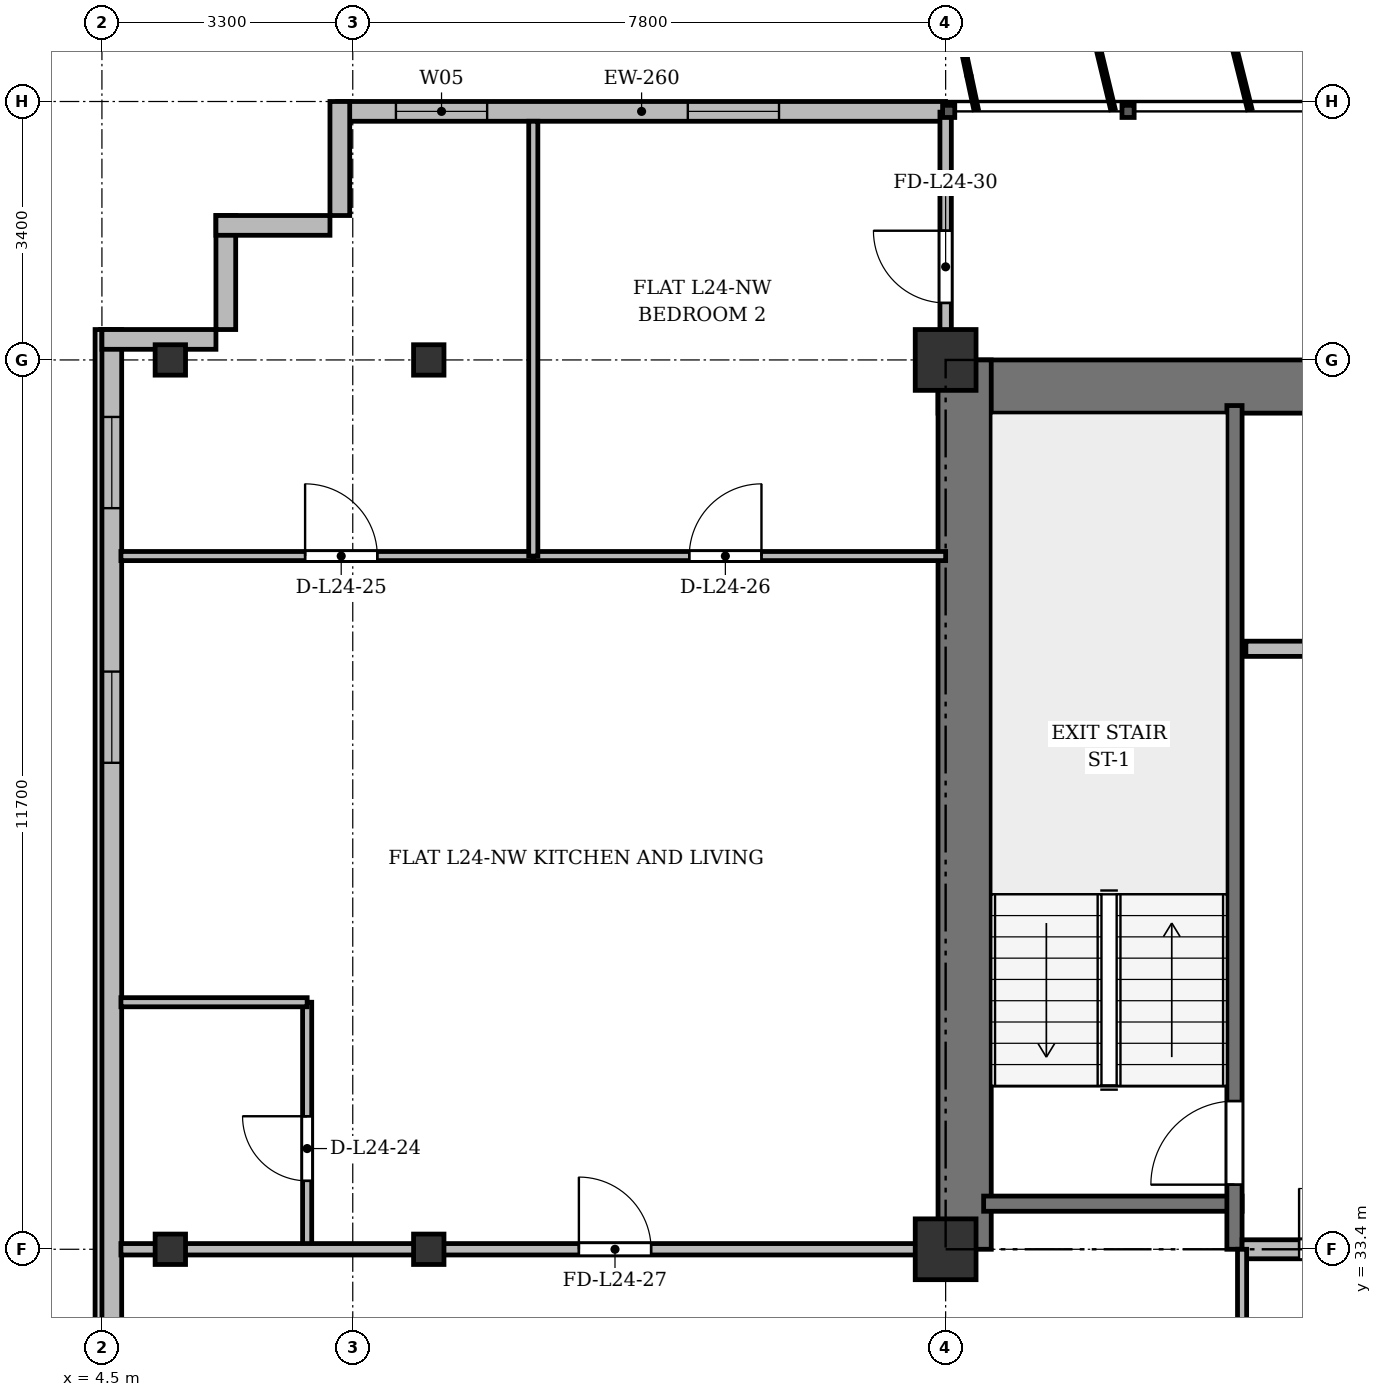
"""IFC4 building model, lengths in metres.
Left out: names, types, materials, properties, quantities, classifications, styles, units other than length and angle.
Written with IfcOpenShell. Run it as: python <this file> out.ifc"""

import sys

from ifc_helpers import new_model, si_unit, direction, frame, frame_2d, origin, origin_2d, place, context, subcontext, project, spatial, rectangle, i_section, extrude, source, transform, mapped, element, fill, save


model = new_model("IFC4")
c1 = context("Model", 3, precision=1e-05, world=origin(), true_north=direction((0.0, 1.0)))
c2 = subcontext(c1, "Body", "Model", "MODEL_VIEW")
j1 = project(units=[si_unit("LENGTHUNIT", "METRE"), si_unit("PLANEANGLEUNIT", "RADIAN")], contexts=[c1])
p1 = place(None, origin())
s1 = spatial("IfcSite", under=j1, at=p1, CompositionType="ELEMENT")
p2 = place(p1, origin())
s2 = spatial("IfcBuilding", under=s1, at=p2, CompositionType="ELEMENT")
p3 = place(p2, frame((0.0, 0.0, 96.1)))
s3 = spatial("IfcBuildingStorey", under=s2, at=p3, CompositionType="ELEMENT", Elevation=96.1)
m1 = source(origin(), c2, "Body", "SweptSolid", [
    extrude(i_section(OverallWidth=0.4, OverallDepth=0.4, WebThickness=0.022, FlangeThickness=0.035, at=origin_2d()), origin(), (0.0, 0.0, 1.0), 3.6),
])
for number, where, z_axis, x_axis in (
    (1, (5.4, 33.4, 0.0), (0.0, 0.0, 1.0), (1.0, 0.0, 0.0)),
    (2, (5.4, 45.1, 0.0), (0.0, 0.0, 1.0), (1.0, 0.0, 0.0)),
    (3, (8.8, 33.4, 0.0), (0.0, 0.0, 1.0), (1.0, 0.0, 0.0)),
    (4, (8.8, 45.1, 0.0), (0.0, 0.0, 1.0), (1.0, 0.0, 0.0)),
):
    element("IfcColumn", number, at=place(p3, frame(where, z_axis=z_axis, x_axis=x_axis)), inside=s3, PredefinedType="COLUMN", context=c2, shape_type="MappedRepresentation", body=[
        mapped(m1, transform((0.0, 0.0, 0.0), x_axis=(1.0, 0.0, 0.0), y_axis=(0.0, 1.0, 0.0), z_axis=(0.0, 0.0, 1.0), scale=1.0)),
    ])
m2 = source(origin(), c2, "Body", "SweptSolid", [
    extrude(rectangle(XDim=0.8, YDim=0.8, at=origin_2d()), origin(), (0.0, 0.0, 1.0), 3.6),
])
for number, where, z_axis, x_axis in (
    (5, (15.6, 33.4, 0.0), (0.0, 0.0, 1.0), (1.0, 0.0, 0.0)),
    (6, (15.6, 45.1, 0.0), (0.0, 0.0, 1.0), (1.0, 0.0, 0.0)),
):
    element("IfcColumn", number, at=place(p3, frame(where, z_axis=z_axis, x_axis=x_axis)), inside=s3, PredefinedType="COLUMN", context=c2, shape_type="MappedRepresentation", body=[
        mapped(m2, transform((0.0, 0.0, 0.0), x_axis=(1.0, 0.0, 0.0), y_axis=(0.0, 1.0, 0.0), z_axis=(0.0, 0.0, 1.0), scale=1.0)),
    ])
p4 = place(p3, frame((7.6, 48.37, 0.0), z_axis=(0.0, 0.0, 1.0), x_axis=(1.0, 0.0, 0.0)))
e7 = element("IfcWall", 7, at=p4, inside=s3, PredefinedType="SOLIDWALL", context=c2, shape_type="SweptSolid", body=[
    extrude(rectangle(XDim=8.0, YDim=0.26, at=frame_2d((4.0, 0.0))), origin(), (0.0, 0.0, 1.0), 3.34),
])
p5 = place(p4, frame((0.768, 0.0, 0.9)))
e8 = element("IfcOpeningElement", 8, at=p5, cuts=e7, PredefinedType="OPENING", context=c2, shape_type="SweptSolid", body=[
    extrude(rectangle(XDim=1.2, YDim=1.65, at=frame_2d((0.6, 0.825))), frame((0.0, 0.14, 0.0), z_axis=(0.0, -1.0, 0.0), x_axis=(1.0, 0.0, 0.0)), (0.0, 0.0, 1.0), 0.28),
])
p6 = place(p4, frame((4.608, 0.0, 0.9)))
e9 = element("IfcOpeningElement", 9, at=p6, cuts=e7, PredefinedType="OPENING", context=c2, shape_type="SweptSolid", body=[
    extrude(rectangle(XDim=1.2, YDim=1.65, at=frame_2d((0.6, 0.825))), frame((0.0, 0.14, 0.0), z_axis=(0.0, -1.0, 0.0), x_axis=(1.0, 0.0, 0.0)), (0.0, 0.0, 1.0), 0.28),
])
p7 = place(p3, frame((4.63, 5.9, 0.0), z_axis=(0.0, 0.0, 1.0), x_axis=(0.0, 1.0, 0.0)))
e10 = element("IfcWall", 10, at=p7, inside=s3, PredefinedType="SOLIDWALL", context=c2, shape_type="SweptSolid", body=[
    extrude(rectangle(XDim=39.6, YDim=0.26, at=frame_2d((19.8, 0.0))), origin(), (0.0, 0.0, 1.0), 3.34),
])
p8 = place(p7, frame((1.45, 0.0, 0.92)))
e11 = element("IfcOpeningElement", 11, at=p8, cuts=e10, PredefinedType="OPENING", context=c2, shape_type="SweptSolid", body=[
    extrude(rectangle(XDim=1.2, YDim=1.65, at=frame_2d((0.6, 0.825))), frame((0.0, 0.14, 0.0), z_axis=(0.0, -1.0, 0.0), x_axis=(1.0, 0.0, 0.0)), (0.0, 0.0, 1.0), 0.28),
])
p9 = place(p7, frame((4.2, 0.0, 0.92)))
e12 = element("IfcOpeningElement", 12, at=p9, cuts=e10, PredefinedType="OPENING", context=c2, shape_type="SweptSolid", body=[
    extrude(rectangle(XDim=2.6, YDim=1.9, at=frame_2d((1.3, 0.95))), frame((0.0, 0.14, 0.0), z_axis=(0.0, -1.0, 0.0), x_axis=(1.0, 0.0, 0.0)), (0.0, 0.0, 1.0), 0.28),
])
p10 = place(p7, frame((8.4, 0.0, 0.92)))
e13 = element("IfcOpeningElement", 13, at=p10, cuts=e10, PredefinedType="OPENING", context=c2, shape_type="SweptSolid", body=[
    extrude(rectangle(XDim=2.6, YDim=1.9, at=frame_2d((1.3, 0.95))), frame((0.0, 0.14, 0.0), z_axis=(0.0, -1.0, 0.0), x_axis=(1.0, 0.0, 0.0)), (0.0, 0.0, 1.0), 0.28),
])
p11 = place(p7, frame((33.9, 0.0, 0.92)))
e14 = element("IfcOpeningElement", 14, at=p11, cuts=e10, PredefinedType="OPENING", context=c2, shape_type="SweptSolid", body=[
    extrude(rectangle(XDim=1.2, YDim=1.65, at=frame_2d((0.6, 0.825))), frame((0.0, 0.14, 0.0), z_axis=(0.0, -1.0, 0.0), x_axis=(1.0, 0.0, 0.0)), (0.0, 0.0, 1.0), 0.28),
])
p12 = place(p7, frame((37.25, 0.0, 0.92)))
e15 = element("IfcOpeningElement", 15, at=p12, cuts=e10, PredefinedType="OPENING", context=c2, shape_type="SweptSolid", body=[
    extrude(rectangle(XDim=1.2, YDim=1.65, at=frame_2d((0.6, 0.825))), frame((0.0, 0.14, 0.0), z_axis=(0.0, -1.0, 0.0), x_axis=(1.0, 0.0, 0.0)), (0.0, 0.0, 1.0), 0.28),
])
p13 = place(p3, frame((4.5, 45.37, 0.0), z_axis=(0.0, 0.0, 1.0), x_axis=(1.0, 0.0, 0.0)))
e16 = element("IfcWall", 16, at=p13, inside=s3, PredefinedType="SOLIDWALL", context=c2, shape_type="SweptSolid", body=[
    extrude(rectangle(XDim=1.5, YDim=0.26, at=frame_2d((0.75, 0.0))), origin(), (0.0, 0.0, 1.0), 2.752),
])
for number, where, z_axis, x_axis in (
    (17, (6.13, 45.5, 0.0), (0.0, 0.0, 1.0), (0.0, 1.0, 0.0)),
    (18, (6.0, 46.87, 0.0), (0.0, 0.0, 1.0), (1.0, 0.0, 0.0)),
    (19, (7.63, 47.0, 0.0), (0.0, 0.0, 1.0), (0.0, 1.0, 0.0)),
):
    element("IfcWall", number, at=place(p3, frame(where, z_axis=z_axis, x_axis=x_axis)), inside=s3, PredefinedType="SOLIDWALL", context=c2, shape_type="SweptSolid", body=[
        extrude(rectangle(XDim=1.5, YDim=0.26, at=frame_2d((0.75, 0.0))), origin(), (0.0, 0.0, 1.0), 3.34),
    ])
p14 = place(p3, frame((15.5, 44.75, 0.0), z_axis=(0.0, 0.0, 1.0), x_axis=(1.0, 0.0, 0.0)))
e20 = element("IfcWall", 20, at=p14, inside=s3, PredefinedType="SHEAR", context=c2, shape_type="SweptSolid", body=[
    extrude(rectangle(XDim=43.4, YDim=0.7, at=frame_2d((21.7, 0.0))), origin(), (0.0, 0.0, 1.0), 3.34),
])
p15 = place(p3, frame((15.85, 33.4, 0.0), z_axis=(0.0, 0.0, 1.0), x_axis=(0.0, 1.0, 0.0)))
e21 = element("IfcWall", 21, at=p15, inside=s3, PredefinedType="SHEAR", context=c2, shape_type="SweptSolid", body=[
    extrude(rectangle(XDim=11.7, YDim=0.7, at=frame_2d((5.85, 0.0))), origin(), (0.0, 0.0, 1.0), 3.34),
])
p16 = place(p3, frame((16.1, 34.0, 0.0), z_axis=(0.0, 0.0, 1.0), x_axis=(1.0, 0.0, 0.0)))
e22 = element("IfcWall", 22, at=p16, inside=s3, PredefinedType="SHEAR", context=c2, shape_type="SweptSolid", body=[
    extrude(rectangle(XDim=3.4, YDim=0.2, at=frame_2d((1.7, 0.0))), origin(), (0.0, 0.0, 1.0), 3.34),
])
p17 = place(p3, frame((19.4, 33.4, 0.0), z_axis=(0.0, 0.0, 1.0), x_axis=(0.0, 1.0, 0.0)))
e23 = element("IfcWall", 23, at=p17, inside=s3, PredefinedType="SHEAR", context=c2, shape_type="SweptSolid", body=[
    extrude(rectangle(XDim=11.1, YDim=0.2, at=frame_2d((5.55, 0.0))), origin(), (0.0, 0.0, 1.0), 3.34),
])
p18 = place(p17, frame((0.85, 0.0, 0.0)))
e24 = element("IfcOpeningElement", 24, at=p18, cuts=e23, PredefinedType="OPENING", context=c2, shape_type="SweptSolid", body=[
    extrude(rectangle(XDim=1.1, YDim=2.15, at=frame_2d((0.55, 1.075))), frame((0.0, 0.11, 0.0), z_axis=(0.0, -1.0, 0.0), x_axis=(1.0, 0.0, 0.0)), (0.0, 0.0, 1.0), 0.22),
])
p19 = place(p3, frame((19.55, 41.3, 0.0), z_axis=(0.0, 0.0, 1.0), x_axis=(1.0, 0.0, 0.0)))
e25 = element("IfcWall", 25, at=p19, inside=s3, PredefinedType="SOLIDWALL", context=c2, shape_type="SweptSolid", body=[
    extrude(rectangle(XDim=6.75, YDim=0.2, at=frame_2d((3.375, 0.0))), origin(), (0.0, 0.0, 1.0), 3.34),
])
p20 = place(p19, frame((1.7, 0.0, 0.0)))
e26 = element("IfcOpeningElement", 26, at=p20, cuts=e25, PredefinedType="OPENING", context=c2, shape_type="SweptSolid", body=[
    extrude(rectangle(XDim=1.1, YDim=2.15, at=frame_2d((0.55, 1.075))), frame((0.0, 0.11, 0.0), z_axis=(0.0, -1.0, 0.0), x_axis=(1.0, 0.0, 0.0)), (0.0, 0.0, 1.0), 0.22),
])
p21 = place(p19, frame((4.4, 0.0, 0.0)))
e27 = element("IfcOpeningElement", 27, at=p21, cuts=e25, PredefinedType="OPENING", context=c2, shape_type="SweptSolid", body=[
    extrude(rectangle(XDim=1.1, YDim=2.15, at=frame_2d((0.55, 1.075))), frame((0.0, 0.11, 0.0), z_axis=(0.0, -1.0, 0.0), x_axis=(1.0, 0.0, 0.0)), (0.0, 0.0, 1.0), 0.22),
])
p22 = place(p3, frame((19.5, 33.4, 0.0), z_axis=(0.0, 0.0, 1.0), x_axis=(1.0, 0.0, 0.0)))
e28 = element("IfcWall", 28, at=p22, inside=s3, PredefinedType="PARTITIONING", context=c2, shape_type="SweptSolid", body=[
    extrude(rectangle(XDim=6.8, YDim=0.25, at=frame_2d((3.4, 0.0))), origin(), (0.0, 0.0, 1.0), 2.752),
])
p23 = place(p22, frame((0.75, 0.0, 0.0)))
e29 = element("IfcOpeningElement", 29, at=p23, cuts=e28, PredefinedType="OPENING", context=c2, shape_type="SweptSolid", body=[
    extrude(rectangle(XDim=1.6, YDim=2.2, at=frame_2d((0.8, 1.1))), frame((0.0, 0.135, 0.0), z_axis=(0.0, -1.0, 0.0), x_axis=(1.0, 0.0, 0.0)), (0.0, 0.0, 1.0), 0.27),
])
p24 = place(p3, frame((19.5, 29.8, 0.0), z_axis=(0.0, 0.0, 1.0), x_axis=(0.0, 1.0, 0.0)))
e30 = element("IfcWall", 30, at=p24, inside=s3, PredefinedType="PARTITIONING", context=c2, shape_type="SweptSolid", body=[
    extrude(rectangle(XDim=3.6, YDim=0.12, at=frame_2d((1.8, 0.0))), origin(), (0.0, 0.0, 1.0), 2.752),
])
p25 = place(p3, frame((7.2, 33.4, 0.0), z_axis=(0.0, 0.0, 1.0), x_axis=(0.0, 1.0, 0.0)))
e31 = element("IfcWall", 31, at=p25, inside=s3, PredefinedType="PARTITIONING", context=c2, shape_type="SweptSolid", body=[
    extrude(rectangle(XDim=3.25, YDim=0.12, at=frame_2d((1.625, 0.0))), origin(), (0.0, 0.0, 1.0), 2.752),
])
p26 = place(p25, frame((0.9, 0.0, 0.0)))
e32 = element("IfcOpeningElement", 32, at=p26, cuts=e31, PredefinedType="OPENING", context=c2, shape_type="SweptSolid", body=[
    extrude(rectangle(XDim=0.85, YDim=2.1, at=frame_2d((0.425, 1.05))), frame((0.0, 0.07, 0.0), z_axis=(0.0, -1.0, 0.0), x_axis=(1.0, 0.0, 0.0)), (0.0, 0.0, 1.0), 0.14),
])
p27 = place(p3, frame((4.75, 36.65, 0.0), z_axis=(0.0, 0.0, 1.0), x_axis=(1.0, 0.0, 0.0)))
e33 = element("IfcWall", 33, at=p27, inside=s3, PredefinedType="PARTITIONING", context=c2, shape_type="SweptSolid", body=[
    extrude(rectangle(XDim=2.45, YDim=0.12, at=frame_2d((1.225, 0.0))), origin(), (0.0, 0.0, 1.0), 2.84),
])
p28 = place(p3, frame((4.75, 42.52, 0.0), z_axis=(0.0, 0.0, 1.0), x_axis=(1.0, 0.0, 0.0)))
e34 = element("IfcWall", 34, at=p28, inside=s3, PredefinedType="PARTITIONING", context=c2, shape_type="SweptSolid", body=[
    extrude(rectangle(XDim=5.425, YDim=0.12, at=frame_2d((2.712, 0.0))), origin(), (0.0, 0.0, 1.0), 2.84),
])
p29 = place(p28, frame((2.423, 0.0, 0.0)))
e35 = element("IfcOpeningElement", 35, at=p29, cuts=e34, PredefinedType="OPENING", context=c2, shape_type="SweptSolid", body=[
    extrude(rectangle(XDim=0.95, YDim=2.15, at=frame_2d((0.475, 1.075))), frame((0.0, 0.07, 0.0), z_axis=(0.0, -1.0, 0.0), x_axis=(1.0, 0.0, 0.0)), (0.0, 0.0, 1.0), 0.14),
])
p30 = place(p3, frame((10.175, 42.52, 0.0), z_axis=(0.0, 0.0, 1.0), x_axis=(1.0, 0.0, 0.0)))
e36 = element("IfcWall", 36, at=p30, inside=s3, PredefinedType="PARTITIONING", context=c2, shape_type="SweptSolid", body=[
    extrude(rectangle(XDim=5.425, YDim=0.12, at=frame_2d((2.712, 0.0))), origin(), (0.0, 0.0, 1.0), 2.84),
])
p31 = place(p30, frame((2.052, 0.0, 0.0)))
e37 = element("IfcOpeningElement", 37, at=p31, cuts=e36, PredefinedType="OPENING", context=c2, shape_type="SweptSolid", body=[
    extrude(rectangle(XDim=0.95, YDim=2.15, at=frame_2d((0.475, 1.075))), frame((0.0, 0.07, 0.0), z_axis=(0.0, -1.0, 0.0), x_axis=(1.0, 0.0, 0.0)), (0.0, 0.0, 1.0), 0.14),
])
p32 = place(p3, frame((10.175, 42.52, 0.0), z_axis=(0.0, 0.0, 1.0), x_axis=(0.0, 1.0, 0.0)))
e38 = element("IfcWall", 38, at=p32, inside=s3, PredefinedType="PARTITIONING", context=c2, shape_type="SweptSolid", body=[
    extrude(rectangle(XDim=5.72, YDim=0.12, at=frame_2d((2.86, 0.0))), origin(), (0.0, 0.0, 1.0), 2.752),
])
p33 = place(p3, frame((4.75, 33.4, 0.0), z_axis=(0.0, 0.0, 1.0), x_axis=(1.0, 0.0, 0.0)))
e39 = element("IfcWall", 39, at=p33, inside=s3, PredefinedType="PARTITIONING", context=c2, shape_type="SweptSolid", body=[
    extrude(rectangle(XDim=10.85, YDim=0.15, at=frame_2d((5.425, 0.0))), origin(), (0.0, 0.0, 1.0), 2.752),
])
p34 = place(p33, frame((6.025, 0.0, 0.0)))
e40 = element("IfcOpeningElement", 40, at=p34, cuts=e39, PredefinedType="OPENING", context=c2, shape_type="SweptSolid", body=[
    extrude(rectangle(XDim=0.95, YDim=2.15, at=frame_2d((0.475, 1.075))), frame((0.0, 0.085, 0.0), z_axis=(0.0, -1.0, 0.0), x_axis=(1.0, 0.0, 0.0)), (0.0, 0.0, 1.0), 0.17),
])
p35 = place(p3, frame((15.6, 44.75, 0.0), z_axis=(0.0, 0.0, 1.0), x_axis=(0.0, 1.0, 0.0)))
e41 = element("IfcWall", 41, at=p35, inside=s3, PredefinedType="PARTITIONING", context=c2, shape_type="SweptSolid", body=[
    extrude(rectangle(XDim=3.61, YDim=0.15, at=frame_2d((1.805, 0.0))), origin(), (0.0, 0.0, 1.0), 2.84),
])
p36 = place(p35, frame((1.1, 0.0, 0.0)))
e42 = element("IfcOpeningElement", 42, at=p36, cuts=e41, PredefinedType="OPENING", context=c2, shape_type="SweptSolid", body=[
    extrude(rectangle(XDim=0.95, YDim=2.15, at=frame_2d((0.475, 1.075))), frame((0.0, 0.085, 0.0), z_axis=(0.0, -1.0, 0.0), x_axis=(1.0, 0.0, 0.0)), (0.0, 0.0, 1.0), 0.17),
])
m3 = source(origin(), c2, "Body", "SweptSolid", [
    extrude(rectangle(XDim=1.2, YDim=1.65, at=frame_2d((0.6, 0.825))), frame((0.0, 0.03, 0.0), z_axis=(0.0, -1.0, 0.0), x_axis=(1.0, 0.0, 0.0)), (0.0, 0.0, 1.0), 0.06),
])
p37 = place(p5, origin())
e43 = element("IfcWindow", 43, at=p37, inside=s3, PartitioningType="SINGLE_PANEL", PredefinedType="WINDOW", context=c2, shape_type="MappedRepresentation", body=[
    mapped(m3, transform((0.0, 0.0, 0.0), x_axis=(1.0, 0.0, 0.0), y_axis=(0.0, 1.0, 0.0), z_axis=(0.0, 0.0, 1.0), scale=1.0)),
])
fill(e8, e43)
p38 = place(p6, origin())
e44 = element("IfcWindow", 44, at=p38, inside=s3, PartitioningType="SINGLE_PANEL", PredefinedType="WINDOW", context=c2, shape_type="MappedRepresentation", body=[
    mapped(m3, transform((0.0, 0.0, 0.0), x_axis=(1.0, 0.0, 0.0), y_axis=(0.0, 1.0, 0.0), z_axis=(0.0, 0.0, 1.0), scale=1.0)),
])
fill(e9, e44)
p39 = place(p11, origin())
e45 = element("IfcWindow", 45, at=p39, inside=s3, PartitioningType="SINGLE_PANEL", PredefinedType="WINDOW", context=c2, shape_type="MappedRepresentation", body=[
    mapped(m3, transform((0.0, 0.0, 0.0), x_axis=(1.0, 0.0, 0.0), y_axis=(0.0, 1.0, 0.0), z_axis=(0.0, 0.0, 1.0), scale=1.0)),
])
fill(e14, e45)
p40 = place(p12, origin())
e46 = element("IfcWindow", 46, at=p40, inside=s3, PartitioningType="SINGLE_PANEL", PredefinedType="WINDOW", context=c2, shape_type="MappedRepresentation", body=[
    mapped(m3, transform((0.0, 0.0, 0.0), x_axis=(1.0, 0.0, 0.0), y_axis=(0.0, 1.0, 0.0), z_axis=(0.0, 0.0, 1.0), scale=1.0)),
])
fill(e15, e46)
m4 = source(origin(), c2, "Body", "SweptSolid", [
    extrude(rectangle(XDim=1.1, YDim=2.15, at=frame_2d((0.55, 1.075))), frame((0.0, 0.025, 0.0), z_axis=(0.0, -1.0, 0.0), x_axis=(1.0, 0.0, 0.0)), (0.0, 0.0, 1.0), 0.05),
])
p41 = place(p18, origin())
e47 = element("IfcDoor", 47, at=p41, inside=s3, OperationType="SINGLE_SWING_LEFT", PredefinedType="DOOR", context=c2, shape_type="MappedRepresentation", body=[
    mapped(m4, transform((0.0, 0.0, 0.0), x_axis=(1.0, 0.0, 0.0), y_axis=(0.0, 1.0, 0.0), z_axis=(0.0, 0.0, 1.0), scale=1.0)),
])
fill(e24, e47)
m5 = source(origin(), c2, "Body", "SweptSolid", [
    extrude(rectangle(XDim=1.6, YDim=2.2, at=frame_2d((0.8, 1.1))), frame((0.0, 0.025, 0.0), z_axis=(0.0, -1.0, 0.0), x_axis=(1.0, 0.0, 0.0)), (0.0, 0.0, 1.0), 0.05),
])
p42 = place(p23, origin())
e48 = element("IfcDoor", 48, at=p42, inside=s3, OperationType="DOUBLE_DOOR_SINGLE_SWING", PredefinedType="DOOR", context=c2, shape_type="MappedRepresentation", body=[
    mapped(m5, transform((0.0, 0.0, 0.0), x_axis=(1.0, 0.0, 0.0), y_axis=(0.0, 1.0, 0.0), z_axis=(0.0, 0.0, 1.0), scale=1.0)),
])
fill(e29, e48)
m6 = source(origin(), c2, "Body", "SweptSolid", [
    extrude(rectangle(XDim=0.85, YDim=2.1, at=frame_2d((0.425, 1.05))), frame((0.0, 0.025, 0.0), z_axis=(0.0, -1.0, 0.0), x_axis=(1.0, 0.0, 0.0)), (0.0, 0.0, 1.0), 0.05),
])
p43 = place(p26, origin())
e49 = element("IfcDoor", 49, at=p43, inside=s3, OperationType="SINGLE_SWING_RIGHT", PredefinedType="DOOR", context=c2, shape_type="MappedRepresentation", body=[
    mapped(m6, transform((0.0, 0.0, 0.0), x_axis=(1.0, 0.0, 0.0), y_axis=(0.0, 1.0, 0.0), z_axis=(0.0, 0.0, 1.0), scale=1.0)),
])
fill(e32, e49)
m7 = source(origin(), c2, "Body", "SweptSolid", [
    extrude(rectangle(XDim=0.95, YDim=2.15, at=frame_2d((0.475, 1.075))), frame((0.0, 0.025, 0.0), z_axis=(0.0, -1.0, 0.0), x_axis=(1.0, 0.0, 0.0)), (0.0, 0.0, 1.0), 0.05),
])
p44 = place(p29, origin())
e50 = element("IfcDoor", 50, at=p44, inside=s3, OperationType="SINGLE_SWING_LEFT", PredefinedType="DOOR", context=c2, shape_type="MappedRepresentation", body=[
    mapped(m7, transform((0.0, 0.0, 0.0), x_axis=(1.0, 0.0, 0.0), y_axis=(0.0, 1.0, 0.0), z_axis=(0.0, 0.0, 1.0), scale=1.0)),
])
fill(e35, e50)
p45 = place(p31, origin())
e51 = element("IfcDoor", 51, at=p45, inside=s3, OperationType="SINGLE_SWING_RIGHT", PredefinedType="DOOR", context=c2, shape_type="MappedRepresentation", body=[
    mapped(m7, transform((0.0, 0.0, 0.0), x_axis=(1.0, 0.0, 0.0), y_axis=(0.0, 1.0, 0.0), z_axis=(0.0, 0.0, 1.0), scale=1.0)),
])
fill(e37, e51)
p46 = place(p34, origin())
e52 = element("IfcDoor", 52, at=p46, inside=s3, OperationType="SINGLE_SWING_LEFT", PredefinedType="DOOR", context=c2, shape_type="MappedRepresentation", body=[
    mapped(m7, transform((0.0, 0.0, 0.0), x_axis=(1.0, 0.0, 0.0), y_axis=(0.0, 1.0, 0.0), z_axis=(0.0, 0.0, 1.0), scale=1.0)),
])
fill(e40, e52)
p47 = place(p36, origin())
e53 = element("IfcDoor", 53, at=p47, inside=s3, OperationType="SINGLE_SWING_RIGHT", PredefinedType="DOOR", context=c2, shape_type="MappedRepresentation", body=[
    mapped(m7, transform((0.0, 0.0, 0.0), x_axis=(1.0, 0.0, 0.0), y_axis=(0.0, 1.0, 0.0), z_axis=(0.0, 0.0, 1.0), scale=1.0)),
])
fill(e42, e53)
save(model, sys.argv[1])
